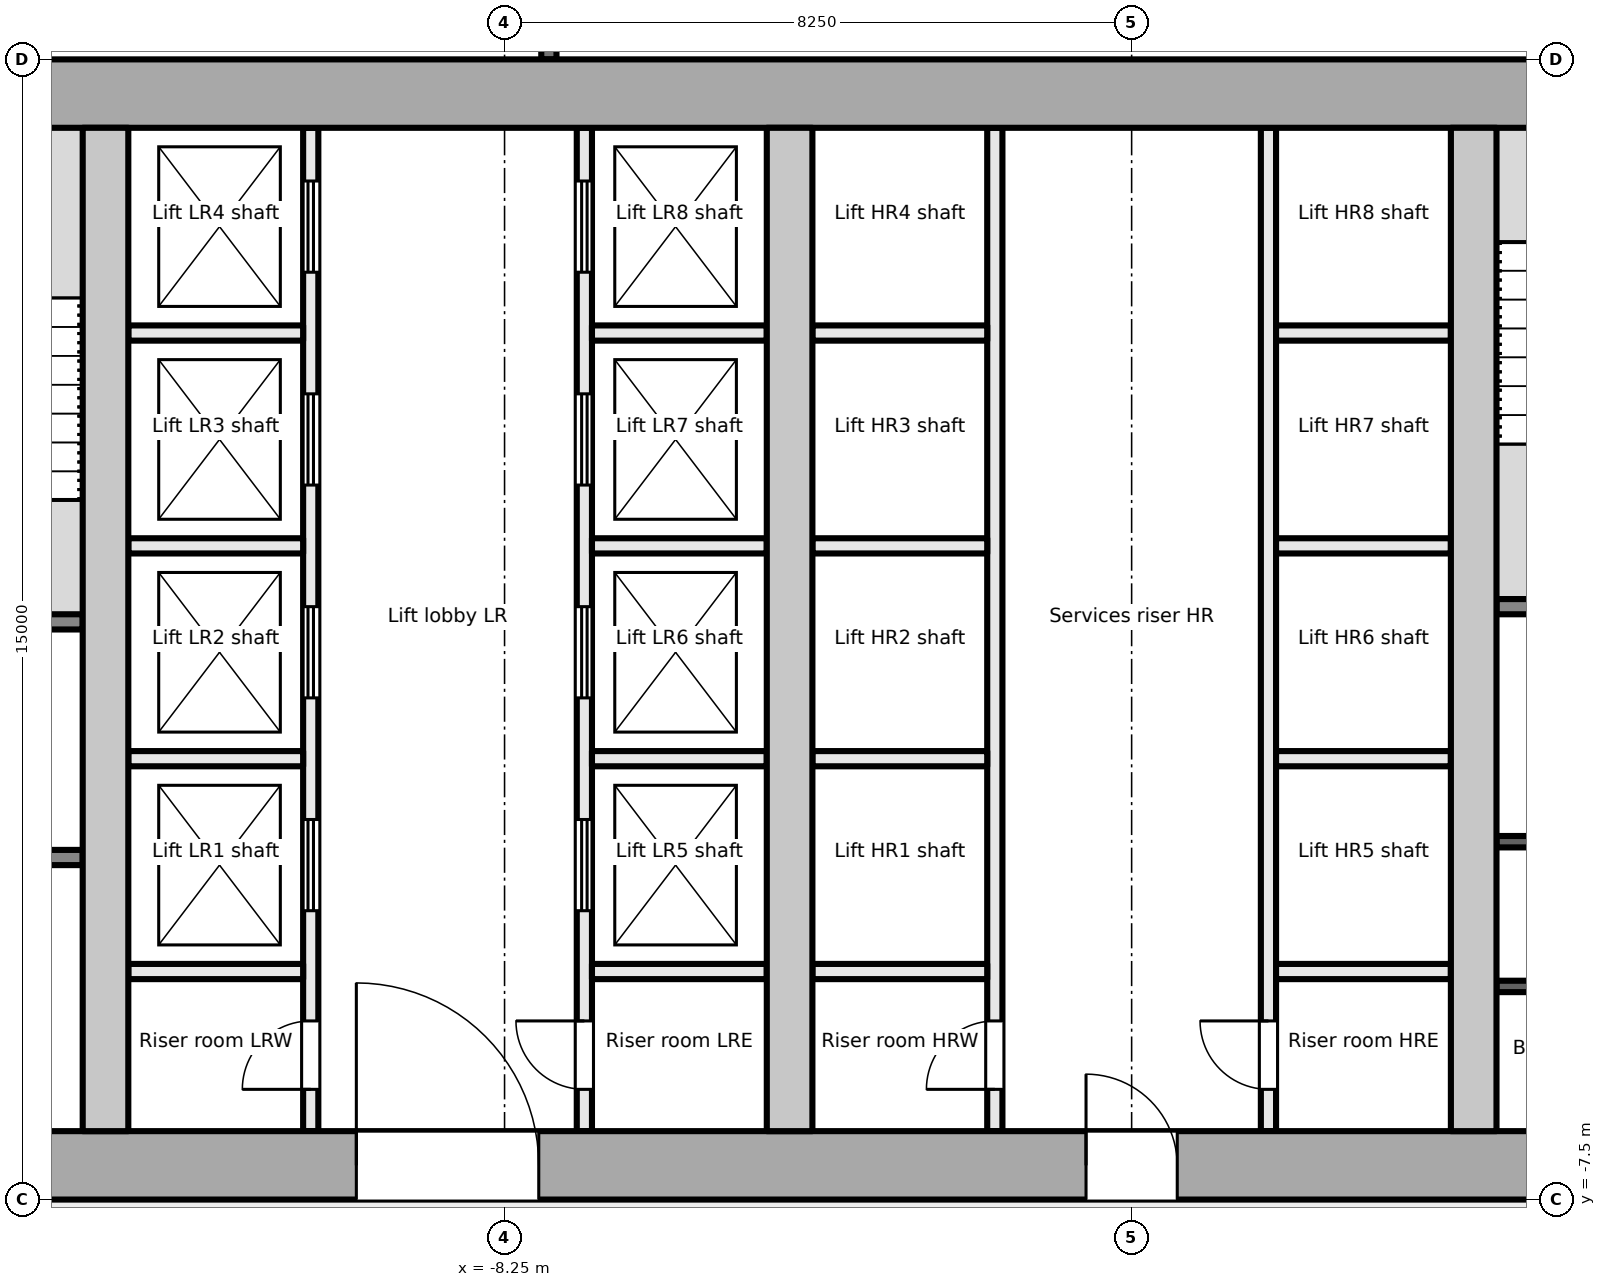
"""IFC4 building model, lengths in metres.
Left out: names, types, materials, properties, quantities, classifications, styles, units other than length and angle.
Written with IfcOpenShell. Run it as: python <this file> out.ifc"""

import sys

from ifc_helpers import new_model, si_unit, direction, frame, frame_2d, origin, place, context, subcontext, project, spatial, rectangle, extrude, element, fill, save


model = new_model("IFC4")
c1 = context("Model", 3, precision=1e-05, world=origin(), true_north=direction((0.0, 1.0)))
c2 = subcontext(c1, "Body", "Model", "MODEL_VIEW")
j1 = project(units=[si_unit("LENGTHUNIT", "METRE"), si_unit("PLANEANGLEUNIT", "RADIAN")], contexts=[c1])
p1 = place(None, origin())
s1 = spatial("IfcSite", under=j1, at=p1, CompositionType="ELEMENT")
p2 = place(p1, origin())
s2 = spatial("IfcBuilding", under=s1, at=p2, CompositionType="ELEMENT")
p3 = place(p2, frame((0.0, 0.0, 120.7)))
s3 = spatial("IfcBuildingStorey", under=s2, at=p3, CompositionType="ELEMENT", Elevation=120.7)
p4 = place(p3, frame((-18.0, -7.05, -0.2), z_axis=(0.0, 0.0, 1.0), x_axis=(1.0, 0.0, 0.0)))
e1 = element("IfcWall", 1, at=p4, inside=s3, PredefinedType="SHEAR", context=c2, shape_type="SweptSolid", body=[
    extrude(rectangle(XDim=36.0, YDim=0.9, at=frame_2d((18.0, 0.0))), origin(), (0.0, 0.0, 1.0), 5.4),
])
p5 = place(p4, frame((7.8, 0.0, 0.2)))
e2 = element("IfcOpeningElement", 2, at=p5, cuts=e1, PredefinedType="OPENING", context=c2, shape_type="SweptSolid", body=[
    extrude(rectangle(XDim=2.4, YDim=2.1, at=frame_2d((1.2, 1.05))), frame((0.0, 0.46, 0.0), z_axis=(0.0, -1.0, 0.0), x_axis=(1.0, 0.0, 0.0)), (0.0, 0.0, 1.0), 0.921),
])
p6 = place(p4, frame((17.4, 0.0, 0.2)))
e3 = element("IfcOpeningElement", 3, at=p6, cuts=e1, PredefinedType="OPENING", context=c2, shape_type="SweptSolid", body=[
    extrude(rectangle(XDim=1.2, YDim=2.1, at=frame_2d((0.6, 1.05))), frame((0.0, 0.46, 0.0), z_axis=(0.0, -1.0, 0.0), x_axis=(1.0, 0.0, 0.0)), (0.0, 0.0, 1.0), 0.921),
])
p7 = place(p4, frame((26.1, 0.0, 0.2)))
e4 = element("IfcOpeningElement", 4, at=p7, cuts=e1, PredefinedType="OPENING", context=c2, shape_type="SweptSolid", body=[
    extrude(rectangle(XDim=2.4, YDim=2.1, at=frame_2d((1.2, 1.05))), frame((0.0, 0.46, 0.0), z_axis=(0.0, -1.0, 0.0), x_axis=(1.0, 0.0, 0.0)), (0.0, 0.0, 1.0), 0.921),
])
p8 = place(p3, frame((-18.0, 7.05, -0.2), z_axis=(0.0, 0.0, 1.0), x_axis=(1.0, 0.0, 0.0)))
e5 = element("IfcWall", 5, at=p8, inside=s3, PredefinedType="SHEAR", context=c2, shape_type="SweptSolid", body=[
    extrude(rectangle(XDim=36.0, YDim=0.9, at=frame_2d((18.0, 0.0))), origin(), (0.0, 0.0, 1.0), 5.4),
])
for number, where, z_axis, x_axis in (
    (6, (-13.5, -6.6, -0.2), (0.0, 0.0, 1.0), (0.0, 1.0, 0.0)),
    (7, (-4.5, -6.6, -0.2), (0.0, 0.0, 1.0), (0.0, 1.0, 0.0)),
    (8, (4.5, -6.6, -0.2), (0.0, 0.0, 1.0), (0.0, 1.0, 0.0)),
):
    element("IfcWall", number, at=place(p3, frame(where, z_axis=z_axis, x_axis=x_axis)), inside=s3, PredefinedType="SHEAR", context=c2, shape_type="SweptSolid", body=[
        extrude(rectangle(XDim=13.2, YDim=0.6, at=frame_2d((6.6, 0.0))), origin(), (0.0, 0.0, 1.0), 5.4),
    ])
p9 = place(p3, frame((-17.1, -3.0, 0.0), z_axis=(0.0, 0.0, 1.0), x_axis=(1.0, 0.0, 0.0)))
e9 = element("IfcWall", 9, at=p9, inside=s3, PredefinedType="PARTITIONING", context=c2, shape_type="SweptSolid", body=[
    extrude(rectangle(XDim=3.3, YDim=0.2, at=frame_2d((1.65, 0.0))), origin(), (0.0, 0.0, 1.0), 5.2),
])
p10 = place(p9, frame((1.1, 0.0, 0.0)))
e10 = element("IfcOpeningElement", 10, at=p10, cuts=e9, PredefinedType="OPENING", context=c2, shape_type="SweptSolid", body=[
    extrude(rectangle(XDim=1.1, YDim=2.1, at=frame_2d((0.55, 1.05))), frame((0.0, 0.111, 0.0), z_axis=(0.0, -1.0, 0.0), x_axis=(1.0, 0.0, 0.0)), (0.0, 0.0, 1.0), 0.221),
])
p11 = place(p3, frame((-17.1, 0.1, 0.0), z_axis=(0.0, 0.0, 1.0), x_axis=(1.0, 0.0, 0.0)))
e11 = element("IfcWall", 11, at=p11, inside=s3, PredefinedType="PARTITIONING", context=c2, shape_type="SweptSolid", body=[
    extrude(rectangle(XDim=3.3, YDim=0.2, at=frame_2d((1.65, 0.0))), origin(), (0.0, 0.0, 1.0), 5.2),
])
p12 = place(p11, frame((1.1, 0.0, 0.0)))
e12 = element("IfcOpeningElement", 12, at=p12, cuts=e11, PredefinedType="OPENING", context=c2, shape_type="SweptSolid", body=[
    extrude(rectangle(XDim=1.1, YDim=2.1, at=frame_2d((0.55, 1.05))), frame((0.0, 0.111, 0.0), z_axis=(0.0, -1.0, 0.0), x_axis=(1.0, 0.0, 0.0)), (0.0, 0.0, 1.0), 0.221),
])
p13 = place(p3, frame((-10.8, -6.6, 0.0), z_axis=(0.0, 0.0, 1.0), x_axis=(0.0, 1.0, 0.0)))
e13 = element("IfcWall", 13, at=p13, inside=s3, PredefinedType="PARTITIONING", context=c2, shape_type="SweptSolid", body=[
    extrude(rectangle(XDim=13.2, YDim=0.2, at=frame_2d((6.6, 0.0))), origin(), (0.0, 0.0, 1.0), 5.2),
])
p14 = place(p13, frame((0.55, 0.0, 0.0)))
e14 = element("IfcOpeningElement", 14, at=p14, cuts=e13, PredefinedType="OPENING", context=c2, shape_type="SweptSolid", body=[
    extrude(rectangle(XDim=0.9, YDim=2.1, at=frame_2d((0.45, 1.05))), frame((0.0, 0.111, 0.0), z_axis=(0.0, -1.0, 0.0), x_axis=(1.0, 0.0, 0.0)), (0.0, 0.0, 1.0), 0.221),
])
p15 = place(p13, frame((2.9, 0.0, 0.0)))
e15 = element("IfcOpeningElement", 15, at=p15, cuts=e13, PredefinedType="OPENING", context=c2, shape_type="SweptSolid", body=[
    extrude(rectangle(XDim=1.2, YDim=2.1, at=frame_2d((0.6, 1.05))), frame((0.0, 0.111, 0.0), z_axis=(0.0, -1.0, 0.0), x_axis=(1.0, 0.0, 0.0)), (0.0, 0.0, 1.0), 0.221),
])
p16 = place(p13, frame((5.7, 0.0, 0.0)))
e16 = element("IfcOpeningElement", 16, at=p16, cuts=e13, PredefinedType="OPENING", context=c2, shape_type="SweptSolid", body=[
    extrude(rectangle(XDim=1.2, YDim=2.1, at=frame_2d((0.6, 1.05))), frame((0.0, 0.111, 0.0), z_axis=(0.0, -1.0, 0.0), x_axis=(1.0, 0.0, 0.0)), (0.0, 0.0, 1.0), 0.221),
])
p17 = place(p13, frame((8.5, 0.0, 0.0)))
e17 = element("IfcOpeningElement", 17, at=p17, cuts=e13, PredefinedType="OPENING", context=c2, shape_type="SweptSolid", body=[
    extrude(rectangle(XDim=1.2, YDim=2.1, at=frame_2d((0.6, 1.05))), frame((0.0, 0.111, 0.0), z_axis=(0.0, -1.0, 0.0), x_axis=(1.0, 0.0, 0.0)), (0.0, 0.0, 1.0), 0.221),
])
p18 = place(p13, frame((11.3, 0.0, 0.0)))
e18 = element("IfcOpeningElement", 18, at=p18, cuts=e13, PredefinedType="OPENING", context=c2, shape_type="SweptSolid", body=[
    extrude(rectangle(XDim=1.2, YDim=2.1, at=frame_2d((0.6, 1.05))), frame((0.0, 0.111, 0.0), z_axis=(0.0, -1.0, 0.0), x_axis=(1.0, 0.0, 0.0)), (0.0, 0.0, 1.0), 0.221),
])
p19 = place(p3, frame((-7.2, -6.6, 0.0), z_axis=(0.0, 0.0, 1.0), x_axis=(0.0, 1.0, 0.0)))
e19 = element("IfcWall", 19, at=p19, inside=s3, PredefinedType="PARTITIONING", context=c2, shape_type="SweptSolid", body=[
    extrude(rectangle(XDim=13.2, YDim=0.2, at=frame_2d((6.6, 0.0))), origin(), (0.0, 0.0, 1.0), 5.2),
])
p20 = place(p19, frame((0.55, 0.0, 0.0)))
e20 = element("IfcOpeningElement", 20, at=p20, cuts=e19, PredefinedType="OPENING", context=c2, shape_type="SweptSolid", body=[
    extrude(rectangle(XDim=0.9, YDim=2.1, at=frame_2d((0.45, 1.05))), frame((0.0, 0.111, 0.0), z_axis=(0.0, -1.0, 0.0), x_axis=(1.0, 0.0, 0.0)), (0.0, 0.0, 1.0), 0.221),
])
p21 = place(p19, frame((2.9, 0.0, 0.0)))
e21 = element("IfcOpeningElement", 21, at=p21, cuts=e19, PredefinedType="OPENING", context=c2, shape_type="SweptSolid", body=[
    extrude(rectangle(XDim=1.2, YDim=2.1, at=frame_2d((0.6, 1.05))), frame((0.0, 0.111, 0.0), z_axis=(0.0, -1.0, 0.0), x_axis=(1.0, 0.0, 0.0)), (0.0, 0.0, 1.0), 0.221),
])
p22 = place(p19, frame((5.7, 0.0, 0.0)))
e22 = element("IfcOpeningElement", 22, at=p22, cuts=e19, PredefinedType="OPENING", context=c2, shape_type="SweptSolid", body=[
    extrude(rectangle(XDim=1.2, YDim=2.1, at=frame_2d((0.6, 1.05))), frame((0.0, 0.111, 0.0), z_axis=(0.0, -1.0, 0.0), x_axis=(1.0, 0.0, 0.0)), (0.0, 0.0, 1.0), 0.221),
])
p23 = place(p19, frame((8.5, 0.0, 0.0)))
e23 = element("IfcOpeningElement", 23, at=p23, cuts=e19, PredefinedType="OPENING", context=c2, shape_type="SweptSolid", body=[
    extrude(rectangle(XDim=1.2, YDim=2.1, at=frame_2d((0.6, 1.05))), frame((0.0, 0.111, 0.0), z_axis=(0.0, -1.0, 0.0), x_axis=(1.0, 0.0, 0.0)), (0.0, 0.0, 1.0), 0.221),
])
p24 = place(p19, frame((11.3, 0.0, 0.0)))
e24 = element("IfcOpeningElement", 24, at=p24, cuts=e19, PredefinedType="OPENING", context=c2, shape_type="SweptSolid", body=[
    extrude(rectangle(XDim=1.2, YDim=2.1, at=frame_2d((0.6, 1.05))), frame((0.0, 0.111, 0.0), z_axis=(0.0, -1.0, 0.0), x_axis=(1.0, 0.0, 0.0)), (0.0, 0.0, 1.0), 0.221),
])
for number, where, z_axis, x_axis in (
    (25, (-13.2, -1.7, 0.0), (0.0, 0.0, 1.0), (1.0, 0.0, 0.0)),
    (26, (-13.2, 1.1, 0.0), (0.0, 0.0, 1.0), (1.0, 0.0, 0.0)),
    (27, (-13.2, 3.9, 0.0), (0.0, 0.0, 1.0), (1.0, 0.0, 0.0)),
    (28, (-13.2, -4.5, 0.0), (0.0, 0.0, 1.0), (1.0, 0.0, 0.0)),
    (29, (-7.1, -1.7, 0.0), (0.0, 0.0, 1.0), (1.0, 0.0, 0.0)),
    (30, (-7.1, 1.1, 0.0), (0.0, 0.0, 1.0), (1.0, 0.0, 0.0)),
    (31, (-7.1, 3.9, 0.0), (0.0, 0.0, 1.0), (1.0, 0.0, 0.0)),
    (32, (-7.1, -4.5, 0.0), (0.0, 0.0, 1.0), (1.0, 0.0, 0.0)),
):
    element("IfcWall", number, at=place(p3, frame(where, z_axis=z_axis, x_axis=x_axis)), inside=s3, PredefinedType="PARTITIONING", context=c2, shape_type="SweptSolid", body=[
        extrude(rectangle(XDim=2.3, YDim=0.2, at=frame_2d((1.15, 0.0))), origin(), (0.0, 0.0, 1.0), 5.2),
    ])
p25 = place(p3, frame((-1.8, -6.6, 0.0), z_axis=(0.0, 0.0, 1.0), x_axis=(0.0, 1.0, 0.0)))
e33 = element("IfcWall", 33, at=p25, inside=s3, PredefinedType="PARTITIONING", context=c2, shape_type="SweptSolid", body=[
    extrude(rectangle(XDim=13.2, YDim=0.2, at=frame_2d((6.6, 0.0))), origin(), (0.0, 0.0, 1.0), 5.2),
])
p26 = place(p25, frame((0.55, 0.0, 0.0)))
e34 = element("IfcOpeningElement", 34, at=p26, cuts=e33, PredefinedType="OPENING", context=c2, shape_type="SweptSolid", body=[
    extrude(rectangle(XDim=0.9, YDim=2.1, at=frame_2d((0.45, 1.05))), frame((0.0, 0.111, 0.0), z_axis=(0.0, -1.0, 0.0), x_axis=(1.0, 0.0, 0.0)), (0.0, 0.0, 1.0), 0.221),
])
p27 = place(p3, frame((1.8, -6.6, 0.0), z_axis=(0.0, 0.0, 1.0), x_axis=(0.0, 1.0, 0.0)))
e35 = element("IfcWall", 35, at=p27, inside=s3, PredefinedType="PARTITIONING", context=c2, shape_type="SweptSolid", body=[
    extrude(rectangle(XDim=13.2, YDim=0.2, at=frame_2d((6.6, 0.0))), origin(), (0.0, 0.0, 1.0), 5.2),
])
p28 = place(p27, frame((0.55, 0.0, 0.0)))
e36 = element("IfcOpeningElement", 36, at=p28, cuts=e35, PredefinedType="OPENING", context=c2, shape_type="SweptSolid", body=[
    extrude(rectangle(XDim=0.9, YDim=2.1, at=frame_2d((0.45, 1.05))), frame((0.0, 0.111, 0.0), z_axis=(0.0, -1.0, 0.0), x_axis=(1.0, 0.0, 0.0)), (0.0, 0.0, 1.0), 0.221),
])
for number, where, z_axis, x_axis in (
    (37, (-4.2, -1.7, 0.0), (0.0, 0.0, 1.0), (1.0, 0.0, 0.0)),
    (38, (-4.2, 1.1, 0.0), (0.0, 0.0, 1.0), (1.0, 0.0, 0.0)),
    (39, (-4.2, 3.9, 0.0), (0.0, 0.0, 1.0), (1.0, 0.0, 0.0)),
    (40, (-4.2, -4.5, 0.0), (0.0, 0.0, 1.0), (1.0, 0.0, 0.0)),
    (41, (1.9, -1.7, 0.0), (0.0, 0.0, 1.0), (1.0, 0.0, 0.0)),
    (42, (1.9, 1.1, 0.0), (0.0, 0.0, 1.0), (1.0, 0.0, 0.0)),
    (43, (1.9, 3.9, 0.0), (0.0, 0.0, 1.0), (1.0, 0.0, 0.0)),
    (44, (1.9, -4.5, 0.0), (0.0, 0.0, 1.0), (1.0, 0.0, 0.0)),
):
    element("IfcWall", number, at=place(p3, frame(where, z_axis=z_axis, x_axis=x_axis)), inside=s3, PredefinedType="PARTITIONING", context=c2, shape_type="SweptSolid", body=[
        extrude(rectangle(XDim=2.3, YDim=0.2, at=frame_2d((1.15, 0.0))), origin(), (0.0, 0.0, 1.0), 5.2),
    ])
p29 = place(p3, frame((4.8, 0.3, 0.0), z_axis=(0.0, 0.0, 1.0), x_axis=(1.0, 0.0, 0.0)))
e45 = element("IfcWall", 45, at=p29, inside=s3, PredefinedType="PARTITIONING", context=c2, shape_type="SweptSolid", body=[
    extrude(rectangle(XDim=3.15, YDim=0.2, at=frame_2d((1.575, 0.0))), origin(), (0.0, 0.0, 1.0), 5.2),
])
for number, where, z_axis, x_axis in (
    (46, (4.8, -4.696, 0.0), (0.0, 0.0, 1.0), (1.0, 0.0, 0.0)),
    (47, (4.8, -2.792, 0.0), (0.0, 0.0, 1.0), (1.0, 0.0, 0.0)),
):
    element("IfcWall", number, at=place(p3, frame(where, z_axis=z_axis, x_axis=x_axis)), inside=s3, PredefinedType="PARTITIONING", context=c2, shape_type="SweptSolid", body=[
        extrude(rectangle(XDim=3.15, YDim=0.15, at=frame_2d((1.575, 0.0))), origin(), (0.0, 0.0, 1.0), 5.2),
    ])
p30 = place(p3, frame((-7.667, 12.24, 0.0), z_axis=(0.0, 0.0, 1.0), x_axis=(0.0, -1.0, 0.0)))
e48 = element("IfcWall", 48, at=p30, inside=s3, PredefinedType="PARTITIONING", context=c2, shape_type="SweptSolid", body=[
    extrude(rectangle(XDim=4.74, YDim=0.2, at=frame_2d((2.37, 0.0))), origin(), (0.0, 0.0, 1.0), 5.2),
])
p31 = place(p14, origin())
e49 = element("IfcDoor", 49, at=p31, inside=s3, OperationType="SINGLE_SWING_LEFT", PredefinedType="DOOR", context=c2, shape_type="SweptSolid", body=[
    extrude(rectangle(XDim=0.9, YDim=2.1, at=frame_2d((0.45, 1.05))), frame((0.0, 0.025, 0.0), z_axis=(0.0, -1.0, 0.0), x_axis=(1.0, 0.0, 0.0)), (0.0, 0.0, 1.0), 0.05),
])
fill(e14, e49)
p32 = place(p15, origin())
e50 = element("IfcDoor", 50, at=p32, inside=s3, OperationType="DOUBLE_DOOR_SLIDING", PredefinedType="DOOR", context=c2, shape_type="SweptSolid", body=[
    extrude(rectangle(XDim=1.2, YDim=2.1, at=frame_2d((0.6, 1.05))), frame((0.0, 0.025, 0.0), z_axis=(0.0, -1.0, 0.0), x_axis=(1.0, 0.0, 0.0)), (0.0, 0.0, 1.0), 0.05),
])
fill(e15, e50)
p33 = place(p16, origin())
e51 = element("IfcDoor", 51, at=p33, inside=s3, OperationType="DOUBLE_DOOR_SLIDING", PredefinedType="DOOR", context=c2, shape_type="SweptSolid", body=[
    extrude(rectangle(XDim=1.2, YDim=2.1, at=frame_2d((0.6, 1.05))), frame((0.0, 0.025, 0.0), z_axis=(0.0, -1.0, 0.0), x_axis=(1.0, 0.0, 0.0)), (0.0, 0.0, 1.0), 0.05),
])
fill(e16, e51)
p34 = place(p17, origin())
e52 = element("IfcDoor", 52, at=p34, inside=s3, OperationType="DOUBLE_DOOR_SLIDING", PredefinedType="DOOR", context=c2, shape_type="SweptSolid", body=[
    extrude(rectangle(XDim=1.2, YDim=2.1, at=frame_2d((0.6, 1.05))), frame((0.0, 0.025, 0.0), z_axis=(0.0, -1.0, 0.0), x_axis=(1.0, 0.0, 0.0)), (0.0, 0.0, 1.0), 0.05),
])
fill(e17, e52)
p35 = place(p18, origin())
e53 = element("IfcDoor", 53, at=p35, inside=s3, OperationType="DOUBLE_DOOR_SLIDING", PredefinedType="DOOR", context=c2, shape_type="SweptSolid", body=[
    extrude(rectangle(XDim=1.2, YDim=2.1, at=frame_2d((0.6, 1.05))), frame((0.0, 0.025, 0.0), z_axis=(0.0, -1.0, 0.0), x_axis=(1.0, 0.0, 0.0)), (0.0, 0.0, 1.0), 0.05),
])
fill(e18, e53)
p36 = place(p20, origin())
e54 = element("IfcDoor", 54, at=p36, inside=s3, OperationType="SINGLE_SWING_RIGHT", PredefinedType="DOOR", context=c2, shape_type="SweptSolid", body=[
    extrude(rectangle(XDim=0.9, YDim=2.1, at=frame_2d((0.45, 1.05))), frame((0.0, 0.025, 0.0), z_axis=(0.0, -1.0, 0.0), x_axis=(1.0, 0.0, 0.0)), (0.0, 0.0, 1.0), 0.05),
])
fill(e20, e54)
p37 = place(p21, origin())
e55 = element("IfcDoor", 55, at=p37, inside=s3, OperationType="DOUBLE_DOOR_SLIDING", PredefinedType="DOOR", context=c2, shape_type="SweptSolid", body=[
    extrude(rectangle(XDim=1.2, YDim=2.1, at=frame_2d((0.6, 1.05))), frame((0.0, 0.025, 0.0), z_axis=(0.0, -1.0, 0.0), x_axis=(1.0, 0.0, 0.0)), (0.0, 0.0, 1.0), 0.05),
])
fill(e21, e55)
p38 = place(p22, origin())
e56 = element("IfcDoor", 56, at=p38, inside=s3, OperationType="DOUBLE_DOOR_SLIDING", PredefinedType="DOOR", context=c2, shape_type="SweptSolid", body=[
    extrude(rectangle(XDim=1.2, YDim=2.1, at=frame_2d((0.6, 1.05))), frame((0.0, 0.025, 0.0), z_axis=(0.0, -1.0, 0.0), x_axis=(1.0, 0.0, 0.0)), (0.0, 0.0, 1.0), 0.05),
])
fill(e22, e56)
p39 = place(p23, origin())
e57 = element("IfcDoor", 57, at=p39, inside=s3, OperationType="DOUBLE_DOOR_SLIDING", PredefinedType="DOOR", context=c2, shape_type="SweptSolid", body=[
    extrude(rectangle(XDim=1.2, YDim=2.1, at=frame_2d((0.6, 1.05))), frame((0.0, 0.025, 0.0), z_axis=(0.0, -1.0, 0.0), x_axis=(1.0, 0.0, 0.0)), (0.0, 0.0, 1.0), 0.05),
])
fill(e23, e57)
p40 = place(p24, origin())
e58 = element("IfcDoor", 58, at=p40, inside=s3, OperationType="DOUBLE_DOOR_SLIDING", PredefinedType="DOOR", context=c2, shape_type="SweptSolid", body=[
    extrude(rectangle(XDim=1.2, YDim=2.1, at=frame_2d((0.6, 1.05))), frame((0.0, 0.025, 0.0), z_axis=(0.0, -1.0, 0.0), x_axis=(1.0, 0.0, 0.0)), (0.0, 0.0, 1.0), 0.05),
])
fill(e24, e58)
p41 = place(p5, origin())
e59 = element("IfcDoor", 59, at=p41, inside=s3, OperationType="DOUBLE_DOOR_DOUBLE_SWING", PredefinedType="DOOR", context=c2, shape_type="SweptSolid", body=[
    extrude(rectangle(XDim=2.4, YDim=2.1, at=frame_2d((1.2, 1.05))), frame((0.0, 0.025, 0.0), z_axis=(0.0, -1.0, 0.0), x_axis=(1.0, 0.0, 0.0)), (0.0, 0.0, 1.0), 0.05),
])
fill(e2, e59)
p42 = place(p26, origin())
e60 = element("IfcDoor", 60, at=p42, inside=s3, OperationType="SINGLE_SWING_LEFT", PredefinedType="DOOR", context=c2, shape_type="SweptSolid", body=[
    extrude(rectangle(XDim=0.9, YDim=2.1, at=frame_2d((0.45, 1.05))), frame((0.0, 0.025, 0.0), z_axis=(0.0, -1.0, 0.0), x_axis=(1.0, 0.0, 0.0)), (0.0, 0.0, 1.0), 0.05),
])
fill(e34, e60)
p43 = place(p28, origin())
e61 = element("IfcDoor", 61, at=p43, inside=s3, OperationType="SINGLE_SWING_RIGHT", PredefinedType="DOOR", context=c2, shape_type="SweptSolid", body=[
    extrude(rectangle(XDim=0.9, YDim=2.1, at=frame_2d((0.45, 1.05))), frame((0.0, 0.025, 0.0), z_axis=(0.0, -1.0, 0.0), x_axis=(1.0, 0.0, 0.0)), (0.0, 0.0, 1.0), 0.05),
])
fill(e36, e61)
p44 = place(p6, origin())
e62 = element("IfcDoor", 62, at=p44, inside=s3, OperationType="SINGLE_SWING_LEFT", PredefinedType="DOOR", context=c2, shape_type="SweptSolid", body=[
    extrude(rectangle(XDim=1.2, YDim=2.1, at=frame_2d((0.6, 1.05))), frame((0.0, 0.025, 0.0), z_axis=(0.0, -1.0, 0.0), x_axis=(1.0, 0.0, 0.0)), (0.0, 0.0, 1.0), 0.05),
])
fill(e3, e62)
save(model, sys.argv[1])
